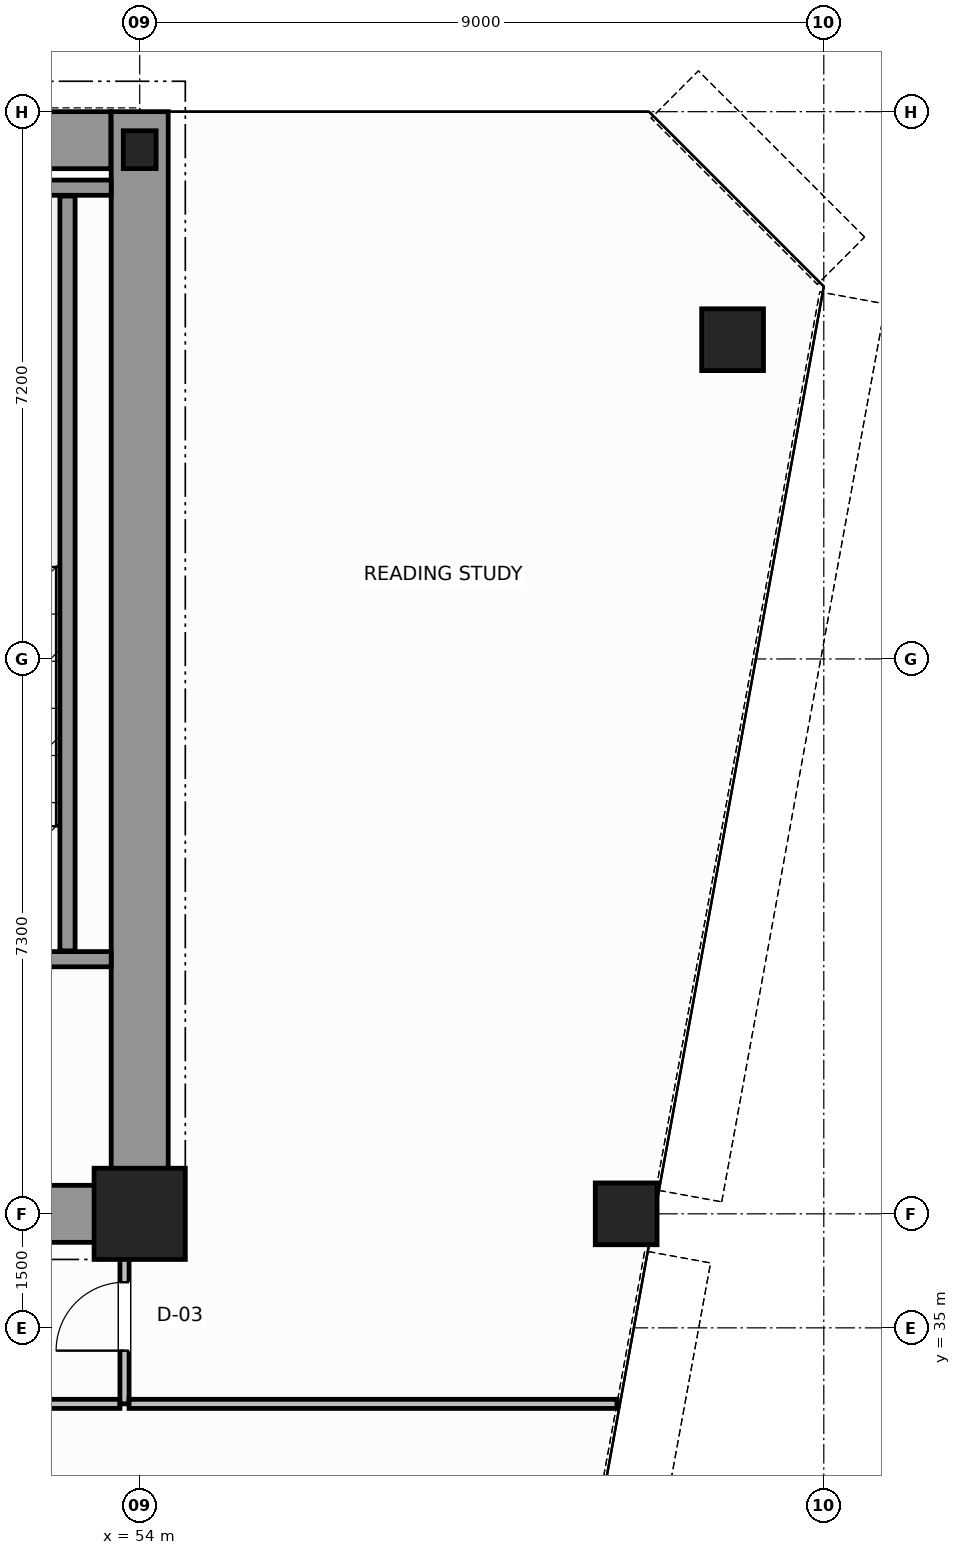
"""IFC4 building model, lengths in metres.
Left out: names, types, materials, properties, quantities, classifications, styles, units other than length and angle.
Written with IfcOpenShell. Run it as: python <this file> out.ifc"""

import sys

from ifc_helpers import new_model, si_unit, direction, frame, frame_2d, origin, origin_2d, place, context, subcontext, project, spatial, rectangle, hollow_circle, i_section, extrude, source, transform, mapped, element, fill, save


model = new_model("IFC4")
c1 = context("Model", 3, precision=1e-05, world=origin(), true_north=direction((0.0, 1.0)))
c2 = subcontext(c1, "Body", "Model", "MODEL_VIEW")
j1 = project(units=[si_unit("LENGTHUNIT", "METRE"), si_unit("PLANEANGLEUNIT", "RADIAN")], contexts=[c1])
p1 = place(None, origin())
s1 = spatial("IfcSite", under=j1, at=p1, CompositionType="ELEMENT")
p2 = place(p1, origin())
s2 = spatial("IfcBuilding", under=s1, at=p2, CompositionType="ELEMENT")
p3 = place(p2, frame((0.0, 0.0, 157.6)))
s3 = spatial("IfcBuildingStorey", under=s2, at=p3, CompositionType="ELEMENT", Elevation=157.6)
m1 = source(origin(), c2, "Body", "SweptSolid", [
    extrude(rectangle(XDim=1.2, YDim=1.2, at=origin_2d()), origin(), (0.0, 0.0, 1.0), 3.8),
])
p4 = place(p3, frame((54.0, 36.5, 0.0), z_axis=(0.0, 0.0, 1.0), x_axis=(1.0, 0.0, 0.0)))
e1 = element("IfcColumn", 1, at=p4, inside=s3, PredefinedType="COLUMN", context=c2, shape_type="MappedRepresentation", body=[
    mapped(m1, transform((0.0, 0.0, 0.0), scale=1.0)),
])
m2 = source(origin(), c2, "Body", "SweptSolid", [
    extrude(i_section(OverallWidth=0.432, OverallDepth=0.498, WebThickness=0.055, FlangeThickness=0.068, FilletRadius=0.015, at=origin_2d()), origin(), (0.0, 0.0, 1.0), 3.8),
])
p5 = place(p3, frame((54.0, 50.5, 0.0), z_axis=(0.0, 0.0, 1.0), x_axis=(1.0, 0.0, 0.0)))
e2 = element("IfcColumn", 2, at=p5, inside=s3, PredefinedType="COLUMN", context=c2, shape_type="MappedRepresentation", body=[
    mapped(m2, transform((0.0, 0.0, 0.0), scale=1.0)),
])
m3 = source(origin(), c2, "Body", "SweptSolid", [
    extrude(hollow_circle(Radius=0.406, WallThickness=0.04, at=origin_2d()), origin(), (0.0, 0.0, 1.0), 3.8),
])
for number, where, z_axis, x_axis in (
    (3, (61.8, 48.0, 0.0), (0.0, 0.0, 1.0), (1.0, 0.0, 0.0)),
    (4, (60.4, 36.5, 0.0), (0.0, 0.0, 1.0), (1.0, 0.0, 0.0)),
):
    element("IfcColumn", number, at=place(p3, frame(where, z_axis=z_axis, x_axis=x_axis)), inside=s3, PredefinedType="COLUMN", context=c2, shape_type="MappedRepresentation", body=[
        mapped(m3, transform((0.0, 0.0, 0.0), scale=1.0)),
    ])
p6 = place(p3, frame((34.002, 50.625, 0.0), z_axis=(0.0, 0.0, 1.0), x_axis=(1.0, 0.0, 0.0)))
e5 = element("IfcWall", 5, at=p6, inside=s3, PredefinedType="SHEAR", context=c2, shape_type="SweptSolid", body=[
    extrude(rectangle(XDim=19.619, YDim=0.75, at=frame_2d((9.81, 0.0))), origin(), (0.0, 0.0, 1.0), 3.8),
])
p7 = place(p3, frame((54.0, 36.5, 0.0), z_axis=(0.0, 0.0, 1.0), x_axis=(0.0, 1.0, 0.0)))
e6 = element("IfcWall", 6, at=p7, inside=s3, PredefinedType="SHEAR", context=c2, shape_type="SweptSolid", body=[
    extrude(rectangle(XDim=14.5, YDim=0.75, at=frame_2d((7.25, 0.0))), origin(), (0.0, 0.0, 1.0), 3.8),
])
p8 = place(p3, frame((49.8, 36.5, 0.0), z_axis=(0.0, 0.0, 1.0), x_axis=(1.0, 0.0, 0.0)))
e7 = element("IfcWall", 7, at=p8, inside=s3, PredefinedType="SHEAR", context=c2, shape_type="SweptSolid", body=[
    extrude(rectangle(XDim=3.805, YDim=0.75, at=frame_2d((1.902, 0.0))), origin(), (0.0, 0.0, 1.0), 2.38),
])
p9 = place(p3, frame((49.4, 39.85, 0.0), z_axis=(0.0, 0.0, 1.0), x_axis=(1.0, 0.0, 0.0)))
e8 = element("IfcWall", 8, at=p9, inside=s3, PredefinedType="SOLIDWALL", context=c2, shape_type="SweptSolid", body=[
    extrude(rectangle(XDim=4.225, YDim=0.2, at=frame_2d((2.113, 0.0))), origin(), (0.0, 0.0, 1.0), 3.8),
])
p10 = place(p9, frame((1.325, 0.0, 0.0)))
e9 = element("IfcOpeningElement", 9, at=p10, cuts=e8, PredefinedType="OPENING", context=c2, shape_type="SweptSolid", body=[
    extrude(rectangle(XDim=1.1, YDim=2.15, at=frame_2d((0.55, 1.075))), frame((0.0, 0.11, 0.0), z_axis=(0.0, -1.0, 0.0), x_axis=(1.0, 0.0, 0.0)), (0.0, 0.0, 1.0), 0.22),
])
p11 = place(p3, frame((49.4, 50.0, 0.0), z_axis=(0.0, 0.0, 1.0), x_axis=(1.0, 0.0, 0.0)))
e10 = element("IfcWall", 10, at=p11, inside=s3, PredefinedType="SOLIDWALL", context=c2, shape_type="SweptSolid", body=[
    extrude(rectangle(XDim=4.225, YDim=0.2, at=frame_2d((2.113, 0.0))), origin(), (0.0, 0.0, 1.0), 3.8),
])
p12 = place(p3, frame((53.05, 39.96, 0.0), z_axis=(0.0, 0.0, 1.0), x_axis=(0.0, 1.0, 0.0)))
e11 = element("IfcWall", 11, at=p12, inside=s3, PredefinedType="SOLIDWALL", context=c2, shape_type="SweptSolid", body=[
    extrude(rectangle(XDim=9.93, YDim=0.2, at=frame_2d((4.965, 0.0))), origin(), (0.0, 0.0, 1.0), 3.8),
])
p13 = place(p3, frame((37.46, 34.0, 0.0), z_axis=(0.0, 0.0, 1.0), x_axis=(1.0, 0.0, 0.0)))
e12 = element("IfcWall", 12, at=p13, inside=s3, PredefinedType="PARTITIONING", context=c2, shape_type="SweptSolid", body=[
    extrude(rectangle(XDim=16.28, YDim=0.12, at=frame_2d((8.14, 0.0))), origin(), (0.0, 0.0, 1.0), 3.58),
])
p14 = place(p3, frame((53.8, 34.0, 0.0), z_axis=(0.0, 0.0, 1.0), x_axis=(0.0, 1.0, 0.0)))
e13 = element("IfcWall", 13, at=p14, inside=s3, PredefinedType="PARTITIONING", context=c2, shape_type="SweptSolid", body=[
    extrude(rectangle(XDim=2.44, YDim=0.12, at=frame_2d((1.22, 0.0))), origin(), (0.0, 0.0, 1.0), 3.58),
])
p15 = place(p14, frame((0.7, 0.0, 0.0)))
e14 = element("IfcOpeningElement", 14, at=p15, cuts=e13, PredefinedType="OPENING", context=c2, shape_type="SweptSolid", body=[
    extrude(rectangle(XDim=0.9, YDim=2.15, at=frame_2d((0.45, 1.075))), frame((0.0, 0.07, 0.0), z_axis=(0.0, -1.0, 0.0), x_axis=(1.0, 0.0, 0.0)), (0.0, 0.0, 1.0), 0.14),
])
p16 = place(p3, frame((53.86, 34.0, 0.0), z_axis=(0.0, 0.0, 1.0), x_axis=(1.0, 0.0, 0.0)))
e15 = element("IfcWall", 15, at=p16, inside=s3, PredefinedType="PARTITIONING", context=c2, shape_type="SweptSolid", body=[
    extrude(rectangle(XDim=6.418, YDim=0.12, at=frame_2d((3.209, 0.0))), origin(), (0.0, 0.0, 1.0), 3.58),
])
m4 = source(origin(), c2, "Body", "SweptSolid", [
    extrude(rectangle(XDim=0.9, YDim=2.15, at=frame_2d((0.45, 1.075))), frame((0.0, 0.025, 0.0), z_axis=(0.0, -1.0, 0.0), x_axis=(1.0, 0.0, 0.0)), (0.0, 0.0, 1.0), 0.05),
])
p17 = place(p15, origin())
e16 = element("IfcDoor", 16, at=p17, inside=s3, OperationType="SINGLE_SWING_RIGHT", PredefinedType="DOOR", context=c2, shape_type="MappedRepresentation", body=[
    mapped(m4, transform((0.0, 0.0, 0.0), scale=1.0)),
])
fill(e14, e16)
save(model, sys.argv[1])
